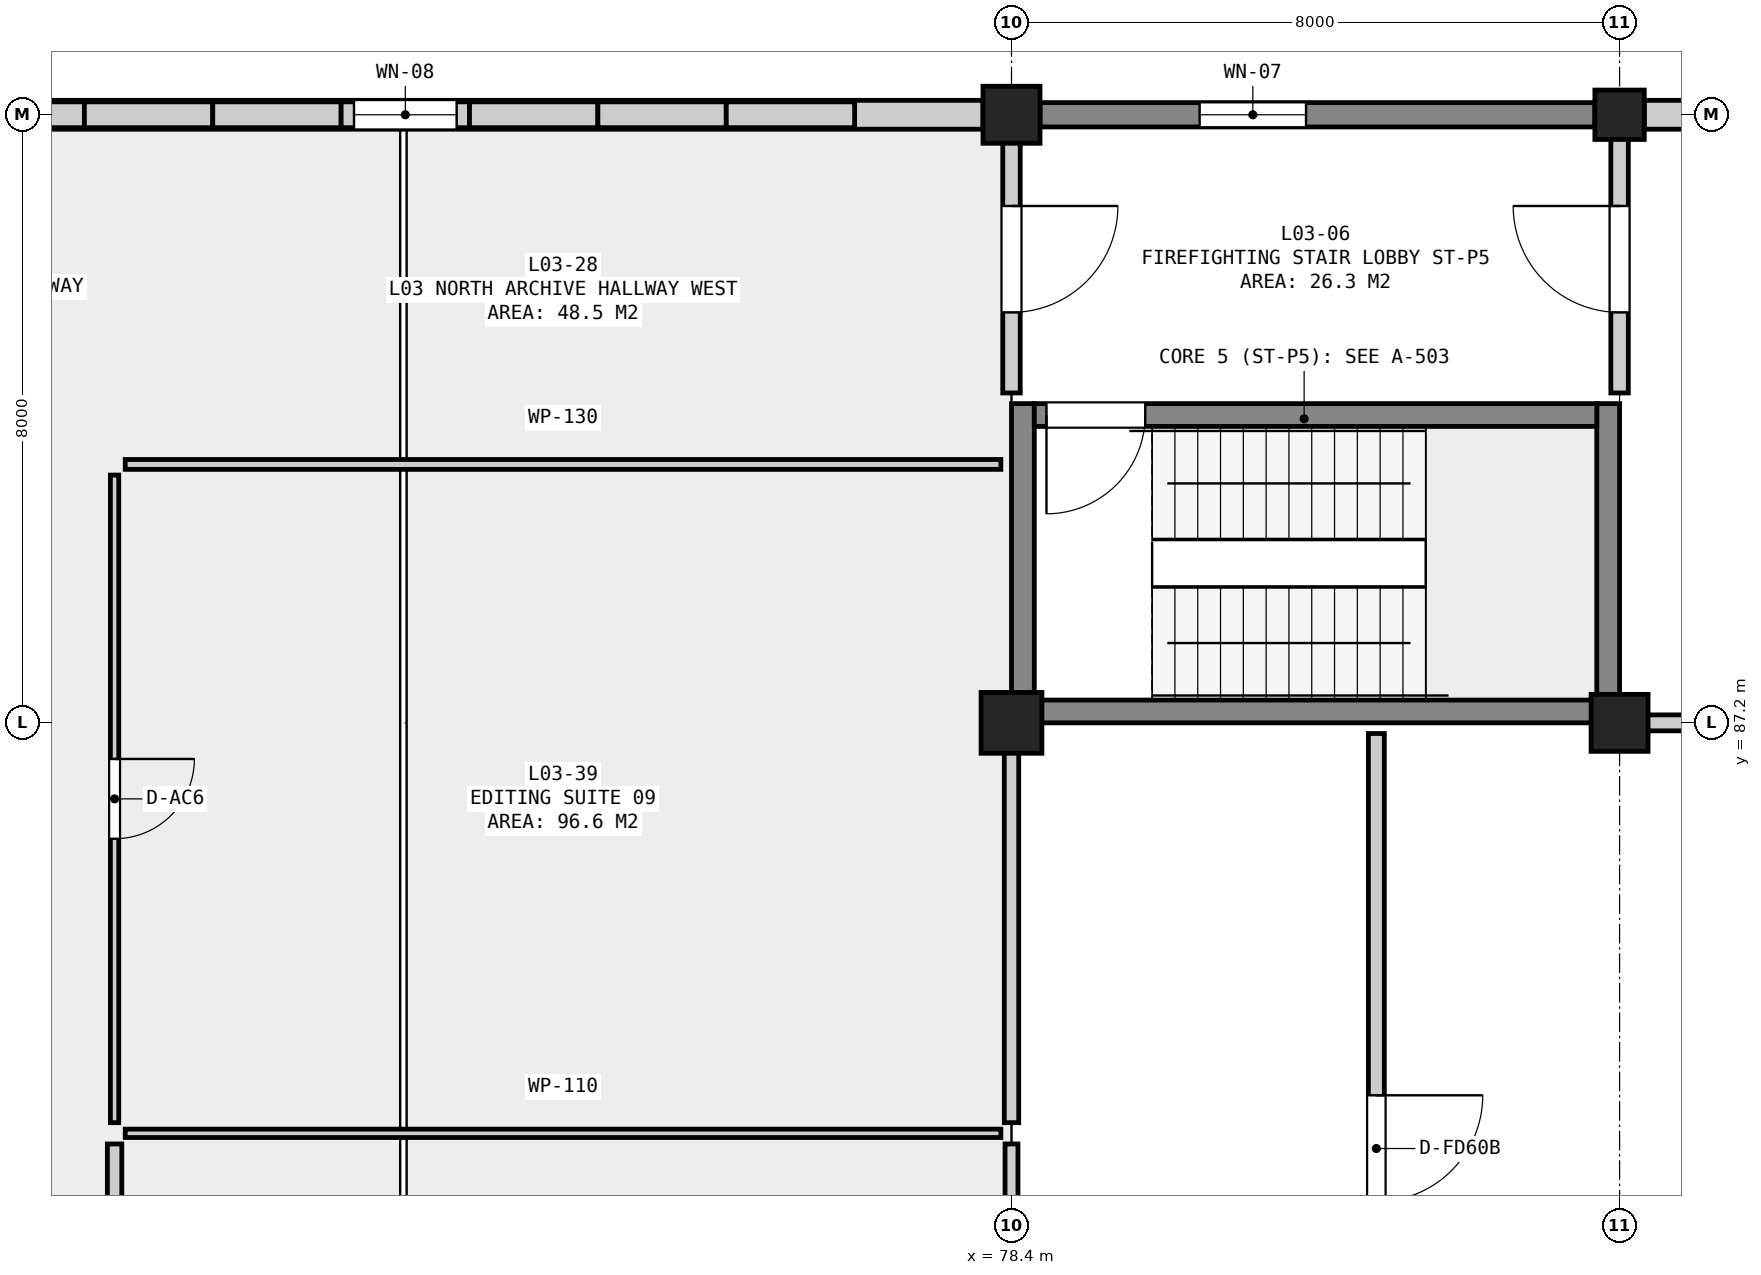
"""IFC4 building model, lengths in metres.
Left out: names, types, materials, properties, quantities, classifications, styles, units other than length and angle.
Written with IfcOpenShell. Run it as: python <this file> out.ifc"""

import sys

from ifc_helpers import new_model, si_unit, direction, frame, frame_2d, origin, origin_2d, place, context, subcontext, project, spatial, rectangle, extrude, element, fill, save


model = new_model("IFC4")
c1 = context("Model", 3, precision=1e-05, world=origin(), true_north=direction((0.0, 1.0)))
c2 = subcontext(c1, "Body", "Model", "MODEL_VIEW")
j1 = project(units=[si_unit("LENGTHUNIT", "METRE"), si_unit("PLANEANGLEUNIT", "RADIAN")], contexts=[c1])
p1 = place(None, origin())
s1 = spatial("IfcSite", under=j1, at=p1, CompositionType="ELEMENT")
p2 = place(p1, origin())
s2 = spatial("IfcBuilding", under=s1, at=p2, CompositionType="ELEMENT")
p3 = place(p2, frame((0.0, 0.0, 15.6)))
s3 = spatial("IfcBuildingStorey", under=s2, at=p3, CompositionType="ELEMENT", Elevation=15.6)
p4 = place(p3, frame((78.4, 87.2, 0.0), z_axis=(0.0, 0.0, 1.0), x_axis=(1.0, 0.0, 0.0)))
e1 = element("IfcColumn", 1, at=p4, inside=s3, PredefinedType="COLUMN", context=c2, shape_type="SweptSolid", body=[
    extrude(rectangle(XDim=0.8, YDim=0.8, at=origin_2d()), origin(), (0.0, 0.0, 1.0), 4.2),
])
for number, where, z_axis, x_axis in (
    (2, (78.4, 95.2, 0.0), (0.0, 0.0, 1.0), (1.0, 0.0, 0.0)),
    (3, (86.4, 87.2, 0.0), (0.0, 0.0, 1.0), (1.0, 0.0, 0.0)),
):
    element("IfcColumn", number, at=place(p3, frame(where, z_axis=z_axis, x_axis=x_axis)), inside=s3, PredefinedType="COLUMN", context=c2, shape_type="SweptSolid", body=[
        extrude(rectangle(XDim=0.75, YDim=0.75, at=origin_2d()), origin(), (0.0, 0.0, 1.0), 4.2),
    ])
p5 = place(p3, frame((86.4, 95.2, 0.0), z_axis=(0.0, 0.0, 1.0), x_axis=(1.0, 0.0, 0.0)))
e4 = element("IfcColumn", 4, at=p5, inside=s3, PredefinedType="COLUMN", context=c2, shape_type="SweptSolid", body=[
    extrude(rectangle(XDim=0.65, YDim=0.65, at=origin_2d()), origin(), (0.0, 0.0, 1.0), 4.2),
])
p6 = place(p3, frame((102.2, 95.2, 0.0), z_axis=(0.0, 0.0, 1.0), x_axis=(-1.0, 0.0, 0.0)))
e5 = element("IfcWall", 5, at=p6, inside=s3, PredefinedType="SOLIDWALL", context=c2, shape_type="SweptSolid", body=[
    extrude(rectangle(XDim=15.475, YDim=0.38, at=frame_2d((7.737, 0.0))), origin(), (0.0, 0.0, 1.0), 2.835),
])
p7 = place(p6, frame((7.137, 0.0, 0.9)))
e6 = element("IfcOpeningElement", 6, at=p7, cuts=e5, PredefinedType="OPENING", context=c2, shape_type="SweptSolid", body=[
    extrude(rectangle(XDim=1.2, YDim=1.7, at=frame_2d((0.6, 0.85))), frame((0.0, 0.202, 0.0), z_axis=(0.0, -1.0, 0.0), x_axis=(1.0, 0.0, 0.0)), (0.0, 0.0, 1.0), 0.404),
])
p8 = place(p3, frame((86.075, 95.2, 0.0), z_axis=(0.0, 0.0, 1.0), x_axis=(-1.0, 0.0, 0.0)))
e7 = element("IfcWall", 7, at=p8, inside=s3, PredefinedType="SOLIDWALL", context=c2, shape_type="SweptSolid", body=[
    extrude(rectangle(XDim=7.3, YDim=0.32, at=frame_2d((3.65, 0.0))), origin(), (0.0, 0.0, 1.0), 3.595),
])
p9 = place(p8, frame((3.8, 0.0, 0.9)))
e8 = element("IfcOpeningElement", 8, at=p9, cuts=e7, PredefinedType="OPENING", context=c2, shape_type="SweptSolid", body=[
    extrude(rectangle(XDim=1.4, YDim=1.8, at=frame_2d((0.7, 0.9))), frame((0.0, 0.172, 0.0), z_axis=(0.0, -1.0, 0.0), x_axis=(1.0, 0.0, 0.0)), (0.0, 0.0, 1.0), 0.344),
])
p10 = place(p3, frame((78.025, 95.2, 0.0), z_axis=(0.0, 0.0, 1.0), x_axis=(-1.0, 0.0, 0.0)))
e9 = element("IfcWall", 9, at=p10, inside=s3, PredefinedType="SOLIDWALL", context=c2, shape_type="SweptSolid", body=[
    extrude(rectangle(XDim=15.2, YDim=0.38, at=frame_2d((7.6, 0.0))), origin(), (0.0, 0.0, 1.0), 3.09),
])
p11 = place(p10, frame((6.925, 0.0, 0.9)))
e10 = element("IfcOpeningElement", 10, at=p11, cuts=e9, PredefinedType="OPENING", context=c2, shape_type="SweptSolid", body=[
    extrude(rectangle(XDim=1.35, YDim=1.75, at=frame_2d((0.675, 0.875))), frame((0.0, 0.202, 0.0), z_axis=(0.0, -1.0, 0.0), x_axis=(1.0, 0.0, 0.0)), (0.0, 0.0, 1.0), 0.404),
])
p12 = place(p3, frame((64.514, 95.2, 4.2), z_axis=(0.0, 0.0, 1.0), x_axis=(1.0, 0.0, 0.0)))
e11 = element("IfcWall", 11, at=p12, inside=s3, PredefinedType="SOLIDWALL", context=c2, shape_type="SweptSolid", body=[
    extrude(rectangle(XDim=1.689, YDim=0.34, at=frame_2d((0.844, 0.0))), origin(), (0.0, 0.0, 1.0), 0.547),
])
p13 = place(p3, frame((66.203, 95.2, 4.2), z_axis=(0.0, 0.0, 1.0), x_axis=(1.0, 0.0, 0.0)))
e12 = element("IfcWall", 12, at=p13, inside=s3, PredefinedType="SOLIDWALL", context=c2, shape_type="SweptSolid", body=[
    extrude(rectangle(XDim=1.689, YDim=0.34, at=frame_2d((0.844, 0.0))), origin(), (0.0, 0.0, 1.0), 0.983),
])
p14 = place(p3, frame((67.892, 95.2, 4.2), z_axis=(0.0, 0.0, 1.0), x_axis=(1.0, 0.0, 0.0)))
e13 = element("IfcWall", 13, at=p14, inside=s3, PredefinedType="SOLIDWALL", context=c2, shape_type="SweptSolid", body=[
    extrude(rectangle(XDim=1.689, YDim=0.34, at=frame_2d((0.844, 0.0))), origin(), (0.0, 0.0, 1.0), 1.42),
])
p15 = place(p3, frame((69.581, 95.2, 4.2), z_axis=(0.0, 0.0, 1.0), x_axis=(1.0, 0.0, 0.0)))
e14 = element("IfcWall", 14, at=p15, inside=s3, PredefinedType="SOLIDWALL", context=c2, shape_type="SweptSolid", body=[
    extrude(rectangle(XDim=1.689, YDim=0.34, at=frame_2d((0.844, 0.0))), origin(), (0.0, 0.0, 1.0), 1.844),
])
p16 = place(p3, frame((71.269, 95.2, 4.2), z_axis=(0.0, 0.0, 1.0), x_axis=(1.0, 0.0, 0.0)))
e15 = element("IfcWall", 15, at=p16, inside=s3, PredefinedType="SOLIDWALL", context=c2, shape_type="SweptSolid", body=[
    extrude(rectangle(XDim=1.689, YDim=0.34, at=frame_2d((0.844, 0.0))), origin(), (0.0, 0.0, 1.0), 1.407),
])
p17 = place(p3, frame((72.958, 95.2, 4.2), z_axis=(0.0, 0.0, 1.0), x_axis=(1.0, 0.0, 0.0)))
e16 = element("IfcWall", 16, at=p17, inside=s3, PredefinedType="SOLIDWALL", context=c2, shape_type="SweptSolid", body=[
    extrude(rectangle(XDim=1.689, YDim=0.34, at=frame_2d((0.844, 0.0))), origin(), (0.0, 0.0, 1.0), 0.97),
])
p18 = place(p3, frame((74.647, 95.2, 4.2), z_axis=(0.0, 0.0, 1.0), x_axis=(1.0, 0.0, 0.0)))
e17 = element("IfcWall", 17, at=p18, inside=s3, PredefinedType="SOLIDWALL", context=c2, shape_type="SweptSolid", body=[
    extrude(rectangle(XDim=1.689, YDim=0.34, at=frame_2d((0.844, 0.0))), origin(), (0.0, 0.0, 1.0), 0.534),
])
for number, where, z_axis, x_axis in (
    (18, (78.55, 87.2, 0.0), (0.0, 0.0, 1.0), (0.0, 1.0, 0.0)),
    (19, (86.25, 87.2, 0.0), (0.0, 0.0, 1.0), (0.0, 1.0, 0.0)),
):
    element("IfcWall", number, at=place(p3, frame(where, z_axis=z_axis, x_axis=x_axis)), inside=s3, PredefinedType="SHEAR", context=c2, shape_type="SweptSolid", body=[
        extrude(rectangle(XDim=4.2, YDim=0.3, at=frame_2d((2.1, 0.0))), origin(), (0.0, 0.0, 1.0), 3.9),
    ])
p19 = place(p3, frame((78.7, 87.35, 0.0), z_axis=(0.0, 0.0, 1.0), x_axis=(1.0, 0.0, 0.0)))
e20 = element("IfcWall", 20, at=p19, inside=s3, PredefinedType="SHEAR", context=c2, shape_type="SweptSolid", body=[
    extrude(rectangle(XDim=7.4, YDim=0.3, at=frame_2d((3.7, 0.0))), origin(), (0.0, 0.0, 1.0), 3.9),
])
p20 = place(p3, frame((78.7, 91.25, 0.0), z_axis=(0.0, 0.0, 1.0), x_axis=(1.0, 0.0, 0.0)))
e21 = element("IfcWall", 21, at=p20, inside=s3, PredefinedType="SHEAR", context=c2, shape_type="SweptSolid", body=[
    extrude(rectangle(XDim=7.4, YDim=0.3, at=frame_2d((3.7, 0.0))), origin(), (0.0, 0.0, 1.0), 3.9),
])
p21 = place(p20, frame((0.16, 0.0, 0.0)))
e22 = element("IfcOpeningElement", 22, at=p21, cuts=e21, PredefinedType="OPENING", context=c2, shape_type="SweptSolid", body=[
    extrude(rectangle(XDim=1.3, YDim=2.18, at=frame_2d((0.65, 1.09))), frame((0.0, 0.162, 0.0), z_axis=(0.0, -1.0, 0.0), x_axis=(1.0, 0.0, 0.0)), (0.0, 0.0, 1.0), 0.324),
])
p22 = place(p3, frame((78.4, 91.54, 0.0), z_axis=(0.0, 0.0, 1.0), x_axis=(0.0, 1.0, 0.0)))
e23 = element("IfcWall", 23, at=p22, inside=s3, PredefinedType="SOLIDWALL", context=c2, shape_type="SweptSolid", body=[
    extrude(rectangle(XDim=3.555, YDim=0.23, at=frame_2d((1.777, 0.0))), origin(), (0.0, 0.0, 1.0), 3.3),
])
p23 = place(p22, frame((1.06, 0.0, 0.0)))
e24 = element("IfcOpeningElement", 24, at=p23, cuts=e23, PredefinedType="OPENING", context=c2, shape_type="SweptSolid", body=[
    extrude(rectangle(XDim=1.4, YDim=2.2, at=frame_2d((0.7, 1.1))), frame((0.0, 0.127, 0.0), z_axis=(0.0, -1.0, 0.0), x_axis=(1.0, 0.0, 0.0)), (0.0, 0.0, 1.0), 0.254),
])
p24 = place(p3, frame((86.4, 91.54, 0.0), z_axis=(0.0, 0.0, 1.0), x_axis=(0.0, 1.0, 0.0)))
e25 = element("IfcWall", 25, at=p24, inside=s3, PredefinedType="SOLIDWALL", context=c2, shape_type="SweptSolid", body=[
    extrude(rectangle(XDim=3.455, YDim=0.23, at=frame_2d((1.728, 0.0))), origin(), (0.0, 0.0, 1.0), 3.345),
])
p25 = place(p24, frame((1.06, 0.0, 0.0)))
e26 = element("IfcOpeningElement", 26, at=p25, cuts=e25, PredefinedType="OPENING", context=c2, shape_type="SweptSolid", body=[
    extrude(rectangle(XDim=1.4, YDim=2.2, at=frame_2d((0.7, 1.1))), frame((0.0, 0.127, 0.0), z_axis=(0.0, -1.0, 0.0), x_axis=(1.0, 0.0, 0.0)), (0.0, 0.0, 1.0), 0.254),
])
p26 = place(p3, frame((66.74, 81.8, 0.0), z_axis=(0.0, 0.0, 1.0), x_axis=(1.0, 0.0, 0.0)))
e27 = element("IfcWall", 27, at=p26, inside=s3, PredefinedType="PARTITIONING", context=c2, shape_type="SweptSolid", body=[
    extrude(rectangle(XDim=11.52, YDim=0.11, at=frame_2d((5.76, 0.0))), origin(), (0.0, 0.0, 1.0), 3.9),
])
p27 = place(p3, frame((66.6, 73.34, 0.0), z_axis=(0.0, 0.0, 1.0), x_axis=(0.0, 1.0, 0.0)))
e28 = element("IfcWall", 28, at=p27, inside=s3, PredefinedType="PARTITIONING", context=c2, shape_type="SweptSolid", body=[
    extrude(rectangle(XDim=8.32, YDim=0.19, at=frame_2d((4.16, 0.0))), origin(), (0.0, 0.0, 1.0), 3.9),
])
p28 = place(p27, frame((3.635, 0.0, 0.0)))
e29 = element("IfcOpeningElement", 29, at=p28, cuts=e28, PredefinedType="OPENING", context=c2, shape_type="SweptSolid", body=[
    extrude(rectangle(XDim=1.05, YDim=2.15, at=frame_2d((0.525, 1.075))), frame((0.0, 0.107, 0.0), z_axis=(0.0, -1.0, 0.0), x_axis=(1.0, 0.0, 0.0)), (0.0, 0.0, 1.0), 0.214),
])
p29 = place(p3, frame((78.4, 73.34, 0.0), z_axis=(0.0, 0.0, 1.0), x_axis=(0.0, 1.0, 0.0)))
e30 = element("IfcWall", 30, at=p29, inside=s3, PredefinedType="PARTITIONING", context=c2, shape_type="SweptSolid", body=[
    extrude(rectangle(XDim=8.32, YDim=0.17, at=frame_2d((4.16, 0.0))), origin(), (0.0, 0.0, 1.0), 3.3),
])
p30 = place(p3, frame((66.74, 90.6, 0.0), z_axis=(0.0, 0.0, 1.0), x_axis=(1.0, 0.0, 0.0)))
e31 = element("IfcWall", 31, at=p30, inside=s3, PredefinedType="PARTITIONING", context=c2, shape_type="SweptSolid", body=[
    extrude(rectangle(XDim=11.52, YDim=0.13, at=frame_2d((5.76, 0.0))), origin(), (0.0, 0.0, 1.0), 3.9),
])
p31 = place(p3, frame((66.6, 81.94, 0.0), z_axis=(0.0, 0.0, 1.0), x_axis=(0.0, 1.0, 0.0)))
e32 = element("IfcWall", 32, at=p31, inside=s3, PredefinedType="PARTITIONING", context=c2, shape_type="SweptSolid", body=[
    extrude(rectangle(XDim=8.52, YDim=0.11, at=frame_2d((4.26, 0.0))), origin(), (0.0, 0.0, 1.0), 3.9),
])
p32 = place(p31, frame((3.735, 0.0, 0.0)))
e33 = element("IfcOpeningElement", 33, at=p32, cuts=e32, PredefinedType="OPENING", context=c2, shape_type="SweptSolid", body=[
    extrude(rectangle(XDim=1.05, YDim=2.15, at=frame_2d((0.525, 1.075))), frame((0.0, 0.067, 0.0), z_axis=(0.0, -1.0, 0.0), x_axis=(1.0, 0.0, 0.0)), (0.0, 0.0, 1.0), 0.134),
])
p33 = place(p3, frame((78.4, 81.94, 0.0), z_axis=(0.0, 0.0, 1.0), x_axis=(0.0, 1.0, 0.0)))
e34 = element("IfcWall", 34, at=p33, inside=s3, PredefinedType="PARTITIONING", context=c2, shape_type="SweptSolid", body=[
    extrude(rectangle(XDim=5.12, YDim=0.19, at=frame_2d((2.56, 0.0))), origin(), (0.0, 0.0, 1.0), 3.3),
])
p34 = place(p3, frame((86.24, 87.2, 0.0), z_axis=(0.0, 0.0, 1.0), x_axis=(1.0, 0.0, 0.0)))
e35 = element("IfcWall", 35, at=p34, inside=s3, PredefinedType="SOLIDWALL", context=c2, shape_type="SweptSolid", body=[
    extrude(rectangle(XDim=16.02, YDim=0.21, at=frame_2d((8.01, 0.0))), origin(), (0.0, 0.0, 1.0), 2.745),
])
p35 = place(p3, frame((83.2, 76.14, 0.0), z_axis=(0.0, 0.0, 1.0), x_axis=(0.0, 1.0, 0.0)))
e36 = element("IfcWall", 36, at=p35, inside=s3, PredefinedType="SOLIDWALL", context=c2, shape_type="SweptSolid", body=[
    extrude(rectangle(XDim=10.92, YDim=0.21, at=frame_2d((5.46, 0.0))), origin(), (0.0, 0.0, 1.0), 3.9),
])
p36 = place(p35, frame((4.76, 0.0, 0.0)))
e37 = element("IfcOpeningElement", 37, at=p36, cuts=e36, PredefinedType="OPENING", context=c2, shape_type="SweptSolid", body=[
    extrude(rectangle(XDim=1.4, YDim=2.2, at=frame_2d((0.7, 1.1))), frame((0.0, 0.117, 0.0), z_axis=(0.0, -1.0, 0.0), x_axis=(1.0, 0.0, 0.0)), (0.0, 0.0, 1.0), 0.234),
])
p37 = place(p9, origin())
e38 = element("IfcWindow", 38, at=p37, inside=s3, PartitioningType="SINGLE_PANEL", PredefinedType="WINDOW", context=c2, shape_type="SweptSolid", body=[
    extrude(rectangle(XDim=1.4, YDim=1.8, at=frame_2d((0.7, 0.9))), frame((0.0, 0.03, 0.0), z_axis=(0.0, -1.0, 0.0), x_axis=(1.0, 0.0, 0.0)), (0.0, 0.0, 1.0), 0.06),
])
fill(e8, e38)
p38 = place(p11, origin())
e39 = element("IfcWindow", 39, at=p38, inside=s3, PartitioningType="SINGLE_PANEL", PredefinedType="WINDOW", context=c2, shape_type="SweptSolid", body=[
    extrude(rectangle(XDim=1.35, YDim=1.75, at=frame_2d((0.675, 0.875))), frame((0.0, 0.03, 0.0), z_axis=(0.0, -1.0, 0.0), x_axis=(1.0, 0.0, 0.0)), (0.0, 0.0, 1.0), 0.06),
])
fill(e10, e39)
p39 = place(p21, frame((1.3, 0.0, 0.0), z_axis=(0.0, 0.0, 1.0), x_axis=(-1.0, 0.0, 0.0)))
e40 = element("IfcDoor", 40, at=p39, inside=s3, OperationType="SINGLE_SWING_RIGHT", PredefinedType="DOOR", context=c2, shape_type="SweptSolid", body=[
    extrude(rectangle(XDim=1.3, YDim=2.18, at=frame_2d((0.65, 1.09))), frame((0.0, 0.025, 0.0), z_axis=(0.0, -1.0, 0.0), x_axis=(1.0, 0.0, 0.0)), (0.0, 0.0, 1.0), 0.05),
])
fill(e22, e40)
p40 = place(p23, frame((1.4, 0.0, 0.0), z_axis=(0.0, 0.0, 1.0), x_axis=(-1.0, 0.0, 0.0)))
e41 = element("IfcDoor", 41, at=p40, inside=s3, OperationType="SINGLE_SWING_LEFT", PredefinedType="DOOR", context=c2, shape_type="SweptSolid", body=[
    extrude(rectangle(XDim=1.4, YDim=2.2, at=frame_2d((0.7, 1.1))), frame((0.0, 0.025, 0.0), z_axis=(0.0, -1.0, 0.0), x_axis=(1.0, 0.0, 0.0)), (0.0, 0.0, 1.0), 0.05),
])
fill(e24, e41)
p41 = place(p25, origin())
e42 = element("IfcDoor", 42, at=p41, inside=s3, OperationType="SINGLE_SWING_RIGHT", PredefinedType="DOOR", context=c2, shape_type="SweptSolid", body=[
    extrude(rectangle(XDim=1.4, YDim=2.2, at=frame_2d((0.7, 1.1))), frame((0.0, 0.025, 0.0), z_axis=(0.0, -1.0, 0.0), x_axis=(1.0, 0.0, 0.0)), (0.0, 0.0, 1.0), 0.05),
])
fill(e26, e42)
p42 = place(p32, frame((1.05, 0.0, 0.0), z_axis=(0.0, 0.0, 1.0), x_axis=(-1.0, 0.0, 0.0)))
e43 = element("IfcDoor", 43, at=p42, inside=s3, OperationType="SINGLE_SWING_LEFT", PredefinedType="DOOR", context=c2, shape_type="SweptSolid", body=[
    extrude(rectangle(XDim=1.05, YDim=2.15, at=frame_2d((0.525, 1.075))), frame((0.0, 0.025, 0.0), z_axis=(0.0, -1.0, 0.0), x_axis=(1.0, 0.0, 0.0)), (0.0, 0.0, 1.0), 0.05),
])
fill(e33, e43)
p43 = place(p36, frame((1.4, 0.0, 0.0), z_axis=(0.0, 0.0, 1.0), x_axis=(-1.0, 0.0, 0.0)))
e44 = element("IfcDoor", 44, at=p43, inside=s3, OperationType="SINGLE_SWING_LEFT", PredefinedType="DOOR", context=c2, shape_type="SweptSolid", body=[
    extrude(rectangle(XDim=1.4, YDim=2.2, at=frame_2d((0.7, 1.1))), frame((0.0, 0.025, 0.0), z_axis=(0.0, -1.0, 0.0), x_axis=(1.0, 0.0, 0.0)), (0.0, 0.0, 1.0), 0.05),
])
fill(e37, e44)
save(model, sys.argv[1])
